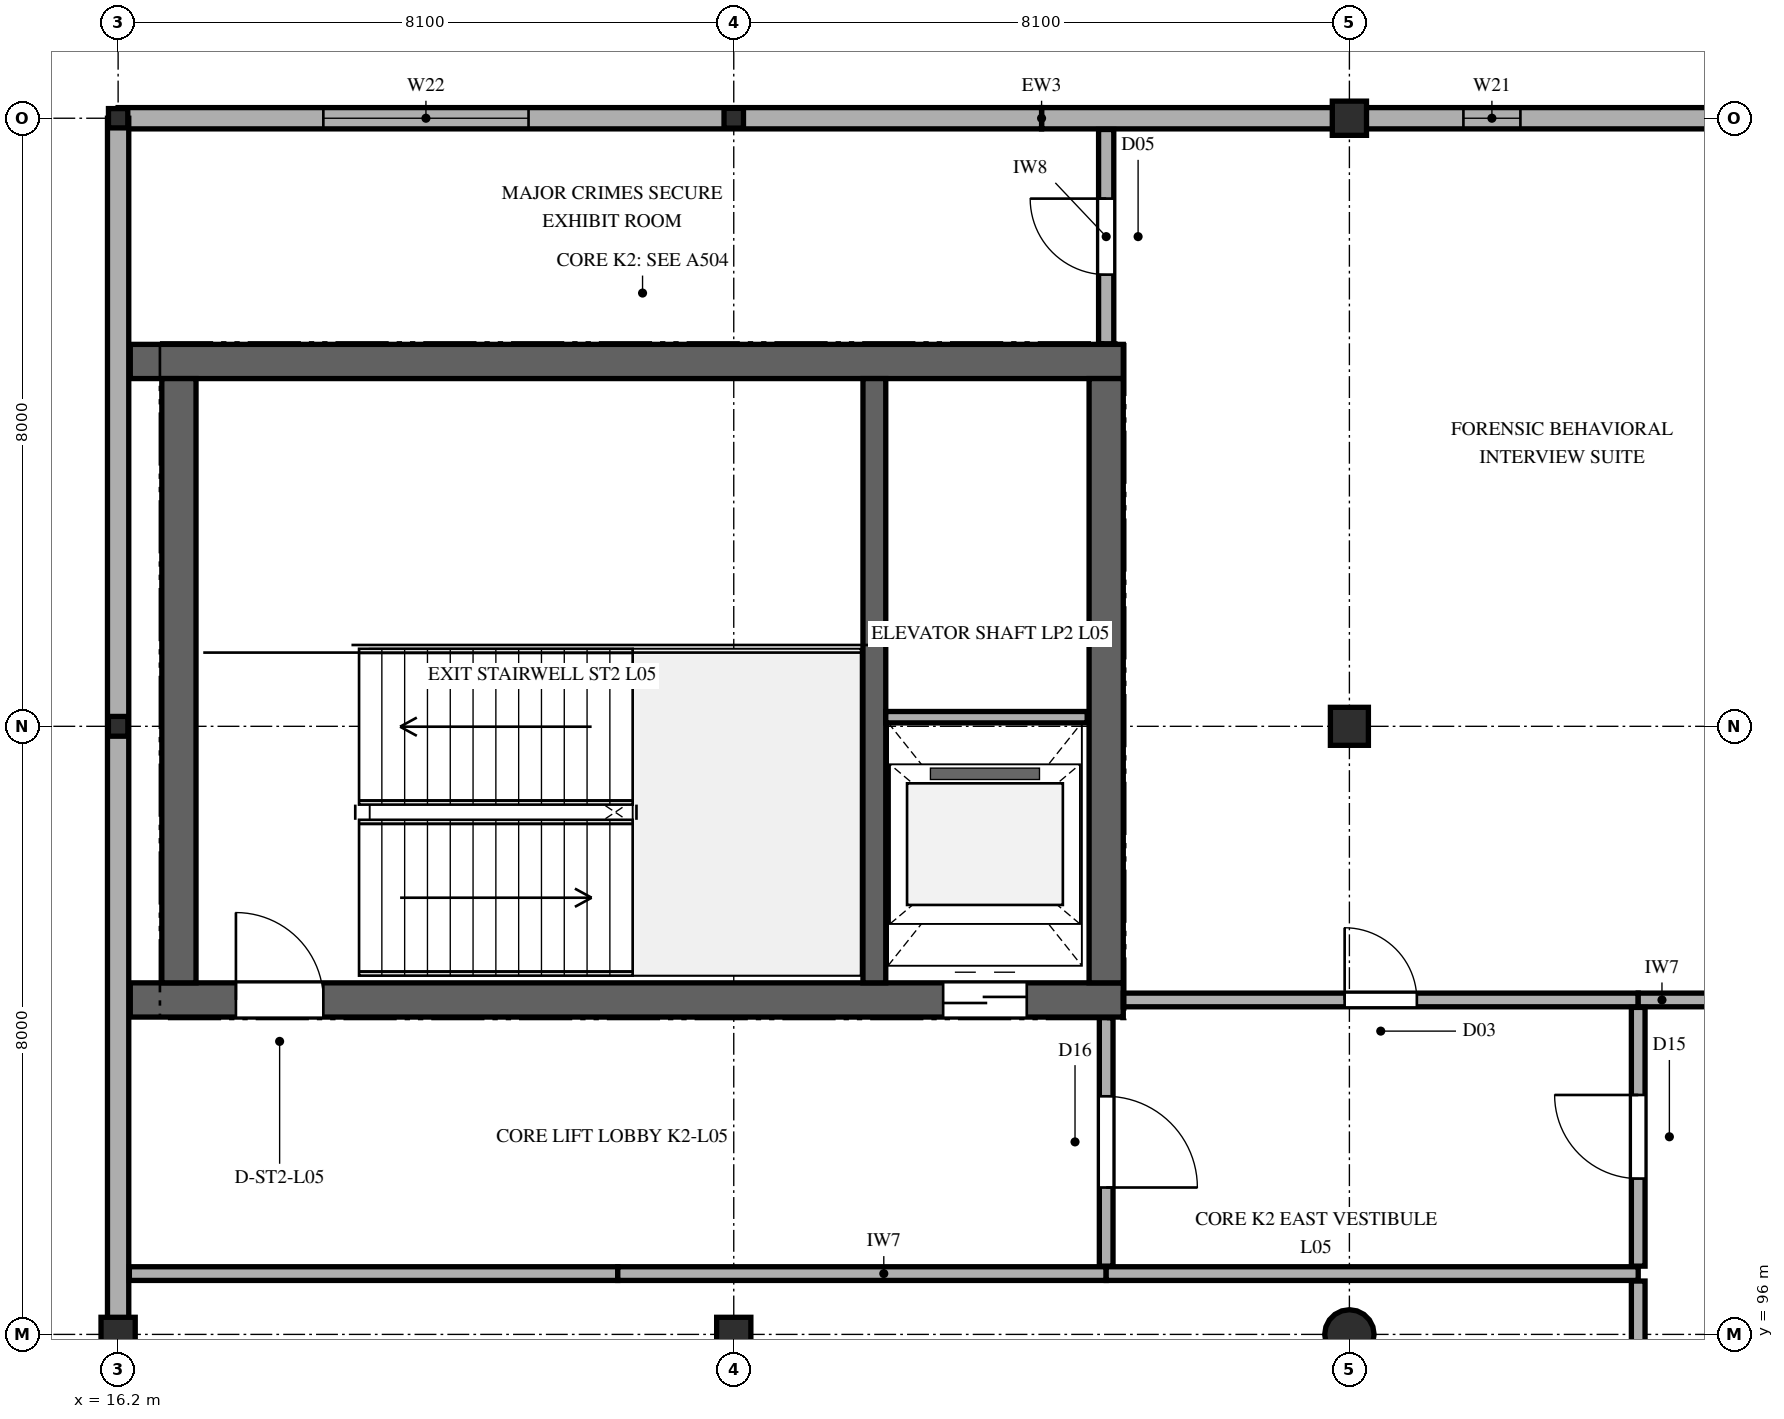
"""IFC4 building model, lengths in metres.
Left out: names, types, materials, properties, quantities, classifications, styles, units other than length and angle.
Written with IfcOpenShell. Run it as: python <this file> out.ifc"""

import sys

from ifc_helpers import new_model, si_unit, direction, frame, frame_2d, origin, origin_2d, place, context, subcontext, project, spatial, rectangle, hollow_rectangle, circle, i_section, extrude, element, fill, save


model = new_model("IFC4")
c1 = context("Model", 3, precision=1e-05, world=origin(), true_north=direction((0.0, 1.0)))
c2 = subcontext(c1, "Body", "Model", "MODEL_VIEW")
j1 = project(units=[si_unit("LENGTHUNIT", "METRE"), si_unit("PLANEANGLEUNIT", "RADIAN")], contexts=[c1])
p1 = place(None, origin())
s1 = spatial("IfcSite", under=j1, at=p1, CompositionType="ELEMENT")
p2 = place(p1, origin())
s2 = spatial("IfcBuilding", under=s1, at=p2, CompositionType="ELEMENT")
p3 = place(p2, frame((0.0, 0.0, 24.9)))
s3 = spatial("IfcBuildingStorey", under=s2, at=p3, CompositionType="ELEMENT", Elevation=24.9)
p4 = place(p3, frame((16.36, 100.4, 0.0), z_axis=(0.0, 0.0, 1.0), x_axis=(1.0, 0.0, 0.0)))
e1 = element("IfcWall", 1, at=p4, inside=s3, PredefinedType="SHEAR", context=c2, shape_type="SweptSolid", body=[
    extrude(rectangle(XDim=13.065, YDim=0.45, at=frame_2d((6.532, 0.0))), origin(), (0.0, 0.0, 1.0), 4.2),
])
p5 = place(p4, frame((1.39, 0.0, 0.0)))
e2 = element("IfcOpeningElement", 2, at=p5, cuts=e1, PredefinedType="OPENING", context=c2, shape_type="SweptSolid", body=[
    extrude(rectangle(XDim=1.15, YDim=2.25, at=frame_2d((0.575, 1.125))), frame((0.0, 0.235, 0.0), z_axis=(0.0, -1.0, 0.0), x_axis=(1.0, 0.0, 0.0)), (0.0, 0.0, 1.0), 0.47),
])
p6 = place(p4, frame((10.695, 0.0, 0.0)))
e3 = element("IfcOpeningElement", 3, at=p6, cuts=e1, PredefinedType="OPENING", context=c2, shape_type="SweptSolid", body=[
    extrude(rectangle(XDim=1.1, YDim=2.2, at=frame_2d((0.55, 1.1))), frame((0.0, 0.235, 0.0), z_axis=(0.0, -1.0, 0.0), x_axis=(1.0, 0.0, 0.0)), (0.0, 0.0, 1.0), 0.47),
])
p7 = place(p3, frame((16.36, 108.8, 0.0), z_axis=(0.0, 0.0, 1.0), x_axis=(1.0, 0.0, 0.0)))
e4 = element("IfcWall", 4, at=p7, inside=s3, PredefinedType="SHEAR", context=c2, shape_type="SweptSolid", body=[
    extrude(rectangle(XDim=13.065, YDim=0.45, at=frame_2d((6.532, 0.0))), origin(), (0.0, 0.0, 1.0), 4.2),
])
for number, where, z_axis, x_axis in (
    (5, (17.0, 100.625, 0.0), (0.0, 0.0, 1.0), (0.0, 1.0, 0.0)),
    (6, (29.2, 100.625, 0.0), (0.0, 0.0, 1.0), (0.0, 1.0, 0.0)),
):
    element("IfcWall", number, at=place(p3, frame(where, z_axis=z_axis, x_axis=x_axis)), inside=s3, PredefinedType="SHEAR", context=c2, shape_type="SweptSolid", body=[
        extrude(rectangle(XDim=7.95, YDim=0.45, at=frame_2d((3.975, 0.0))), origin(), (0.0, 0.0, 1.0), 4.2),
    ])
p8 = place(p3, frame((26.15, 100.625, 0.0), z_axis=(0.0, 0.0, 1.0), x_axis=(0.0, 1.0, 0.0)))
e7 = element("IfcWall", 7, at=p8, inside=s3, PredefinedType="SHEAR", context=c2, shape_type="SweptSolid", body=[
    extrude(rectangle(XDim=7.95, YDim=0.3, at=frame_2d((3.975, 0.0))), origin(), (0.0, 0.0, 1.0), 4.2),
])
p9 = place(p3, frame((16.2, 96.0, 0.0), z_axis=(0.0, 0.0, 1.0), x_axis=(1.0, 0.0, 0.0)))
e8 = element("IfcColumn", 8, at=p9, inside=s3, PredefinedType="COLUMN", context=c2, shape_type="SweptSolid", body=[
    extrude(rectangle(XDim=0.45, YDim=0.45, at=origin_2d()), origin(), (0.0, 0.0, 1.0), 4.2),
])
p10 = place(p3, frame((16.2, 104.0, 0.0), z_axis=(0.0, 0.0, 1.0), x_axis=(1.0, 0.0, 0.0)))
e9 = element("IfcColumn", 9, at=p10, inside=s3, PredefinedType="COLUMN", context=c2, shape_type="SweptSolid", body=[
    extrude(i_section(OverallWidth=0.256, OverallDepth=0.26, WebThickness=0.011, FlangeThickness=0.017, FilletRadius=0.013, at=origin_2d()), origin(), (0.0, 0.0, 1.0), 4.2),
])
p11 = place(p3, frame((16.2, 112.0, 0.0), z_axis=(0.0, 0.0, 1.0), x_axis=(1.0, 0.0, 0.0)))
e10 = element("IfcColumn", 10, at=p11, inside=s3, PredefinedType="COLUMN", context=c2, shape_type="SweptSolid", body=[
    extrude(hollow_rectangle(XDim=0.254, YDim=0.254, WallThickness=0.013, InnerFilletRadius=0.013, OuterFilletRadius=0.025, at=origin_2d()), origin(), (0.0, 0.0, 1.0), 4.2),
])
p12 = place(p3, frame((24.3, 96.0, 0.0), z_axis=(0.0, 0.0, 1.0), x_axis=(1.0, 0.0, 0.0)))
e11 = element("IfcColumn", 11, at=p12, inside=s3, PredefinedType="COLUMN", context=c2, shape_type="SweptSolid", body=[
    extrude(rectangle(XDim=0.45, YDim=0.45, at=origin_2d()), origin(), (0.0, 0.0, 1.0), 4.2),
])
p13 = place(p3, frame((24.3, 112.0, 0.0), z_axis=(0.0, 0.0, 1.0), x_axis=(1.0, 0.0, 0.0)))
e12 = element("IfcColumn", 12, at=p13, inside=s3, PredefinedType="COLUMN", context=c2, shape_type="SweptSolid", body=[
    extrude(i_section(OverallWidth=0.256, OverallDepth=0.26, WebThickness=0.011, FlangeThickness=0.017, FilletRadius=0.013, at=origin_2d()), origin(), (0.0, 0.0, 1.0), 4.2),
])
p14 = place(p3, frame((32.4, 96.0, 0.0), z_axis=(0.0, 0.0, 1.0), x_axis=(1.0, 0.0, 0.0)))
e13 = element("IfcColumn", 13, at=p14, inside=s3, PredefinedType="COLUMN", context=c2, shape_type="SweptSolid", body=[
    extrude(circle(Radius=0.325, at=origin_2d()), origin(), (0.0, 0.0, 1.0), 4.2),
])
p15 = place(p3, frame((32.4, 104.0, 0.0), z_axis=(0.0, 0.0, 1.0), x_axis=(1.0, 0.0, 0.0)))
e14 = element("IfcColumn", 14, at=p15, inside=s3, PredefinedType="COLUMN", context=c2, shape_type="SweptSolid", body=[
    extrude(rectangle(XDim=0.5, YDim=0.5, at=origin_2d()), origin(), (0.0, 0.0, 1.0), 4.2),
])
p16 = place(p3, frame((32.4, 112.0, 0.0), z_axis=(0.0, 0.0, 1.0), x_axis=(1.0, 0.0, 0.0)))
e15 = element("IfcColumn", 15, at=p16, inside=s3, PredefinedType="COLUMN", context=c2, shape_type="SweptSolid", body=[
    extrude(rectangle(XDim=0.45, YDim=0.45, at=origin_2d()), origin(), (0.0, 0.0, 1.0), 4.2),
])
p17 = place(p3, frame((40.5, 112.0, 0.0), z_axis=(0.0, 0.0, 1.0), x_axis=(-1.0, 0.0, 0.0)))
e16 = element("IfcWall", 16, at=p17, inside=s3, PredefinedType="SOLIDWALL", context=c2, shape_type="SweptSolid", body=[
    extrude(rectangle(XDim=12.15, YDim=0.28, at=frame_2d((6.075, 0.0))), origin(), (0.0, 0.0, 1.0), 3.402),
])
p18 = place(p17, frame((5.85, 0.0, 0.85)))
e17 = element("IfcOpeningElement", 17, at=p18, cuts=e16, PredefinedType="OPENING", context=c2, shape_type="SweptSolid", body=[
    extrude(rectangle(XDim=0.75, YDim=2.2, at=frame_2d((0.375, 1.1))), frame((0.0, 0.15, 0.0), z_axis=(0.0, -1.0, 0.0), x_axis=(1.0, 0.0, 0.0)), (0.0, 0.0, 1.0), 0.3),
])
p19 = place(p3, frame((28.35, 112.0, 0.0), z_axis=(0.0, 0.0, 1.0), x_axis=(-1.0, 0.0, 0.0)))
e18 = element("IfcWall", 18, at=p19, inside=s3, PredefinedType="SOLIDWALL", context=c2, shape_type="SweptSolid", body=[
    extrude(rectangle(XDim=12.15, YDim=0.28, at=frame_2d((6.075, 0.0))), origin(), (0.0, 0.0, 1.0), 3.402),
])
p20 = place(p19, frame((6.75, 0.0, 0.95)))
e19 = element("IfcOpeningElement", 19, at=p20, cuts=e18, PredefinedType="OPENING", context=c2, shape_type="SweptSolid", body=[
    extrude(rectangle(XDim=2.7, YDim=0.9, at=frame_2d((1.35, 0.45))), frame((0.0, 0.15, 0.0), z_axis=(0.0, -1.0, 0.0), x_axis=(1.0, 0.0, 0.0)), (0.0, 0.0, 1.0), 0.3),
])
p21 = place(p3, frame((16.2, 112.0, 0.0), z_axis=(0.0, 0.0, 1.0), x_axis=(0.0, -1.0, 0.0)))
e20 = element("IfcWall", 20, at=p21, inside=s3, PredefinedType="SOLIDWALL", context=c2, shape_type="SweptSolid", body=[
    extrude(rectangle(XDim=16.0, YDim=0.28, at=frame_2d((8.0, 0.0))), origin(), (0.0, 0.0, 1.0), 3.452),
])
p22 = place(p3, frame((16.2, 96.0, 0.0), z_axis=(0.0, 0.0, 1.0), x_axis=(0.0, -1.0, 0.0)))
e21 = element("IfcWall", 21, at=p22, inside=s3, PredefinedType="SOLIDWALL", context=c2, shape_type="SweptSolid", body=[
    extrude(rectangle(XDim=16.0, YDim=0.28, at=frame_2d((8.0, 0.0))), origin(), (0.0, 0.0, 1.0), 3.489),
])
p23 = place(p3, frame((26.3, 104.12, 0.0), z_axis=(0.0, 0.0, 1.0), x_axis=(1.0, 0.0, 0.0)))
e22 = element("IfcWall", 22, at=p23, inside=s3, PredefinedType="PARTITIONING", context=c2, shape_type="SweptSolid", body=[
    extrude(rectangle(XDim=2.65, YDim=0.15, at=frame_2d((1.325, 0.0))), origin(), (0.0, 0.0, 1.0), 3.96),
])
for number, where, z_axis, x_axis in (
    (23, (16.348, 96.8, 0.0), (0.0, 0.0, 1.0), (1.0, 0.0, 0.0)),
    (24, (22.774, 96.8, 0.0), (0.0, 0.0, 1.0), (1.0, 0.0, 0.0)),
):
    element("IfcWall", number, at=place(p3, frame(where, z_axis=z_axis, x_axis=x_axis)), inside=s3, PredefinedType="PARTITIONING", context=c2, shape_type="SweptSolid", body=[
        extrude(rectangle(XDim=6.426, YDim=0.18, at=frame_2d((3.213, 0.0))), origin(), (0.0, 0.0, 1.0), 3.96),
    ])
p24 = place(p3, frame((29.2, 96.8, 0.0), z_axis=(0.0, 0.0, 1.0), x_axis=(1.0, 0.0, 0.0)))
e25 = element("IfcWall", 25, at=p24, inside=s3, PredefinedType="PARTITIONING", context=c2, shape_type="SweptSolid", body=[
    extrude(rectangle(XDim=7.0, YDim=0.18, at=frame_2d((3.5, 0.0))), origin(), (0.0, 0.0, 1.0), 3.96),
])
p25 = place(p3, frame((29.425, 100.4, 0.0), z_axis=(0.0, 0.0, 1.0), x_axis=(1.0, 0.0, 0.0)))
e26 = element("IfcWall", 26, at=p25, inside=s3, PredefinedType="PARTITIONING", context=c2, shape_type="SweptSolid", body=[
    extrude(rectangle(XDim=6.775, YDim=0.18, at=frame_2d((3.387, 0.0))), origin(), (0.0, 0.0, 1.0), 3.96),
])
p26 = place(p25, frame((2.913, 0.0, 0.0)))
e27 = element("IfcOpeningElement", 27, at=p26, cuts=e26, PredefinedType="OPENING", context=c2, shape_type="SweptSolid", body=[
    extrude(rectangle(XDim=0.95, YDim=2.15, at=frame_2d((0.475, 1.075))), frame((0.0, 0.1, 0.0), z_axis=(0.0, -1.0, 0.0), x_axis=(1.0, 0.0, 0.0)), (0.0, 0.0, 1.0), 0.2),
])
p27 = place(p3, frame((36.2, 100.4, 0.0), z_axis=(0.0, 0.0, 1.0), x_axis=(1.0, 0.0, 0.0)))
e28 = element("IfcWall", 28, at=p27, inside=s3, PredefinedType="PARTITIONING", context=c2, shape_type="SweptSolid", body=[
    extrude(rectangle(XDim=3.4, YDim=0.18, at=frame_2d((1.7, 0.0))), origin(), (0.0, 0.0, 1.0), 3.96),
])
p28 = place(p3, frame((29.2, 96.898, 0.0), z_axis=(0.0, 0.0, 1.0), x_axis=(0.0, 1.0, 0.0)))
e29 = element("IfcWall", 29, at=p28, inside=s3, PredefinedType="PARTITIONING", context=c2, shape_type="SweptSolid", body=[
    extrude(rectangle(XDim=3.269, YDim=0.18, at=frame_2d((1.635, 0.0))), origin(), (0.0, 0.0, 1.0), 3.96),
])
p29 = place(p28, frame((1.034, 0.0, 0.0)))
e30 = element("IfcOpeningElement", 30, at=p29, cuts=e29, PredefinedType="OPENING", context=c2, shape_type="SweptSolid", body=[
    extrude(rectangle(XDim=1.2, YDim=2.2, at=frame_2d((0.6, 1.1))), frame((0.0, 0.1, 0.0), z_axis=(0.0, -1.0, 0.0), x_axis=(1.0, 0.0, 0.0)), (0.0, 0.0, 1.0), 0.2),
])
p30 = place(p3, frame((29.2, 109.033, 0.0), z_axis=(0.0, 0.0, 1.0), x_axis=(0.0, 1.0, 0.0)))
e31 = element("IfcWall", 31, at=p30, inside=s3, PredefinedType="PARTITIONING", context=c2, shape_type="SweptSolid", body=[
    extrude(rectangle(XDim=2.819, YDim=0.2, at=frame_2d((1.41, 0.0))), origin(), (0.0, 0.0, 1.0), 3.96),
])
p31 = place(p30, frame((0.909, 0.0, 0.0)))
e32 = element("IfcOpeningElement", 32, at=p31, cuts=e31, PredefinedType="OPENING", context=c2, shape_type="SweptSolid", body=[
    extrude(rectangle(XDim=1.0, YDim=2.2, at=frame_2d((0.5, 1.1))), frame((0.0, 0.11, 0.0), z_axis=(0.0, -1.0, 0.0), x_axis=(1.0, 0.0, 0.0)), (0.0, 0.0, 1.0), 0.22),
])
p32 = place(p3, frame((36.2, 82.608, 0.0), z_axis=(0.0, 0.0, 1.0), x_axis=(0.0, 1.0, 0.0)))
e33 = element("IfcWall", 33, at=p32, inside=s3, PredefinedType="PARTITIONING", context=c2, shape_type="SweptSolid", body=[
    extrude(rectangle(XDim=14.094, YDim=0.18, at=frame_2d((7.047, 0.0))), origin(), (0.0, 0.0, 1.0), 3.605),
])
p33 = place(p32, frame((6.547, 0.0, 0.0)))
e34 = element("IfcOpeningElement", 34, at=p33, cuts=e33, PredefinedType="OPENING", context=c2, shape_type="SweptSolid", body=[
    extrude(rectangle(XDim=1.0, YDim=2.2, at=frame_2d((0.5, 1.1))), frame((0.0, 0.1, 0.0), z_axis=(0.0, -1.0, 0.0), x_axis=(1.0, 0.0, 0.0)), (0.0, 0.0, 1.0), 0.2),
])
p34 = place(p3, frame((36.2, 96.898, 0.0), z_axis=(0.0, 0.0, 1.0), x_axis=(0.0, 1.0, 0.0)))
e35 = element("IfcWall", 35, at=p34, inside=s3, PredefinedType="PARTITIONING", context=c2, shape_type="SweptSolid", body=[
    extrude(rectangle(XDim=3.404, YDim=0.18, at=frame_2d((1.702, 0.0))), origin(), (0.0, 0.0, 1.0), 3.649),
])
p35 = place(p34, frame((1.152, 0.0, 0.0)))
e36 = element("IfcOpeningElement", 36, at=p35, cuts=e35, PredefinedType="OPENING", context=c2, shape_type="SweptSolid", body=[
    extrude(rectangle(XDim=1.1, YDim=2.2, at=frame_2d((0.55, 1.1))), frame((0.0, 0.1, 0.0), z_axis=(0.0, -1.0, 0.0), x_axis=(1.0, 0.0, 0.0)), (0.0, 0.0, 1.0), 0.2),
])
p36 = place(p18, origin())
e37 = element("IfcWindow", 37, at=p36, inside=s3, PartitioningType="SINGLE_PANEL", PredefinedType="WINDOW", context=c2, shape_type="SweptSolid", body=[
    extrude(rectangle(XDim=0.75, YDim=2.2, at=frame_2d((0.375, 1.1))), frame((0.0, 0.03, 0.0), z_axis=(0.0, -1.0, 0.0), x_axis=(1.0, 0.0, 0.0)), (0.0, 0.0, 1.0), 0.06),
])
fill(e17, e37)
p37 = place(p20, origin())
e38 = element("IfcWindow", 38, at=p37, inside=s3, PartitioningType="TRIPLE_PANEL_VERTICAL", PredefinedType="WINDOW", context=c2, shape_type="SweptSolid", body=[
    extrude(rectangle(XDim=2.7, YDim=0.9, at=frame_2d((1.35, 0.45))), frame((0.0, 0.03, 0.0), z_axis=(0.0, -1.0, 0.0), x_axis=(1.0, 0.0, 0.0)), (0.0, 0.0, 1.0), 0.06),
])
fill(e19, e38)
p38 = place(p5, origin())
e39 = element("IfcDoor", 39, at=p38, inside=s3, OperationType="SINGLE_SWING_LEFT", PredefinedType="DOOR", context=c2, shape_type="SweptSolid", body=[
    extrude(rectangle(XDim=1.15, YDim=2.25, at=frame_2d((0.575, 1.125))), frame((0.0, 0.025, 0.0), z_axis=(0.0, -1.0, 0.0), x_axis=(1.0, 0.0, 0.0)), (0.0, 0.0, 1.0), 0.05),
])
fill(e2, e39)
p39 = place(p6, frame((1.1, 0.0, 0.0), z_axis=(0.0, 0.0, 1.0), x_axis=(-1.0, 0.0, 0.0)))
e40 = element("IfcDoor", 40, at=p39, inside=s3, OperationType="DOUBLE_DOOR_SLIDING", PredefinedType="DOOR", context=c2, shape_type="SweptSolid", body=[
    extrude(rectangle(XDim=1.1, YDim=2.2, at=frame_2d((0.55, 1.1))), frame((0.0, 0.025, 0.0), z_axis=(0.0, -1.0, 0.0), x_axis=(1.0, 0.0, 0.0)), (0.0, 0.0, 1.0), 0.05),
])
fill(e3, e40)
p40 = place(p26, origin())
e41 = element("IfcDoor", 41, at=p40, inside=s3, OperationType="SINGLE_SWING_LEFT", PredefinedType="DOOR", context=c2, shape_type="SweptSolid", body=[
    extrude(rectangle(XDim=0.95, YDim=2.15, at=frame_2d((0.475, 1.075))), frame((0.0, 0.025, 0.0), z_axis=(0.0, -1.0, 0.0), x_axis=(1.0, 0.0, 0.0)), (0.0, 0.0, 1.0), 0.05),
])
fill(e27, e41)
p41 = place(p29, frame((1.2, 0.0, 0.0), z_axis=(0.0, 0.0, 1.0), x_axis=(-1.0, 0.0, 0.0)))
e42 = element("IfcDoor", 42, at=p41, inside=s3, OperationType="SINGLE_SWING_LEFT", PredefinedType="DOOR", context=c2, shape_type="SweptSolid", body=[
    extrude(rectangle(XDim=1.2, YDim=2.2, at=frame_2d((0.6, 1.1))), frame((0.0, 0.025, 0.0), z_axis=(0.0, -1.0, 0.0), x_axis=(1.0, 0.0, 0.0)), (0.0, 0.0, 1.0), 0.05),
])
fill(e30, e42)
p42 = place(p31, origin())
e43 = element("IfcDoor", 43, at=p42, inside=s3, OperationType="SINGLE_SWING_RIGHT", PredefinedType="DOOR", context=c2, shape_type="SweptSolid", body=[
    extrude(rectangle(XDim=1.0, YDim=2.2, at=frame_2d((0.5, 1.1))), frame((0.0, 0.025, 0.0), z_axis=(0.0, -1.0, 0.0), x_axis=(1.0, 0.0, 0.0)), (0.0, 0.0, 1.0), 0.05),
])
fill(e32, e43)
p43 = place(p35, origin())
e44 = element("IfcDoor", 44, at=p43, inside=s3, OperationType="SINGLE_SWING_RIGHT", PredefinedType="DOOR", context=c2, shape_type="SweptSolid", body=[
    extrude(rectangle(XDim=1.1, YDim=2.2, at=frame_2d((0.55, 1.1))), frame((0.0, 0.025, 0.0), z_axis=(0.0, -1.0, 0.0), x_axis=(1.0, 0.0, 0.0)), (0.0, 0.0, 1.0), 0.05),
])
fill(e36, e44)
save(model, sys.argv[1])
